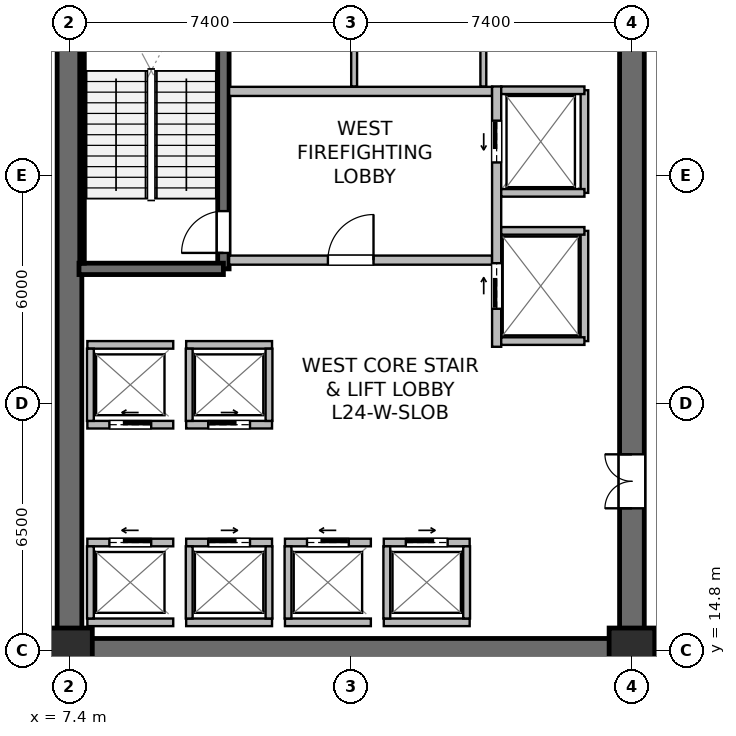
"""IFC4 building model, lengths in metres.
Left out: names, types, materials, properties, quantities, classifications, styles, units other than length and angle.
Written with IfcOpenShell. Run it as: python <this file> out.ifc"""

import sys

from ifc_helpers import new_model, si_unit, direction, frame, frame_2d, origin, origin_2d, place, context, subcontext, project, spatial, rectangle, extrude, source, transform, mapped, element, fill, save


model = new_model("IFC4")
c1 = context("Model", 3, precision=1e-05, world=origin(), true_north=direction((0.0, 1.0)))
c2 = subcontext(c1, "Body", "Model", "MODEL_VIEW")
j1 = project(units=[si_unit("LENGTHUNIT", "METRE"), si_unit("PLANEANGLEUNIT", "RADIAN")], contexts=[c1])
p1 = place(None, origin())
s1 = spatial("IfcSite", under=j1, at=p1, CompositionType="ELEMENT")
p2 = place(p1, origin())
s2 = spatial("IfcBuilding", under=s1, at=p2, CompositionType="ELEMENT")
p3 = place(p2, frame((0.0, 0.0, 100.3)))
s3 = spatial("IfcBuildingStorey", under=s2, at=p3, CompositionType="ELEMENT", Elevation=100.3)
p4 = place(p3, frame((7.075, 14.8, 0.0), z_axis=(0.0, 0.0, 1.0), x_axis=(1.0, 0.0, 0.0)))
e1 = element("IfcWall", 1, at=p4, inside=s3, PredefinedType="SHEAR", context=c2, shape_type="SweptSolid", body=[
    extrude(rectangle(XDim=15.45, YDim=0.65, at=frame_2d((7.725, 0.0))), origin(), (0.0, 0.0, 1.0), 4.49),
])
p5 = place(p3, frame((7.4, 15.125, 0.0), z_axis=(0.0, 0.0, 1.0), x_axis=(0.0, 1.0, 0.0)))
e2 = element("IfcWall", 2, at=p5, inside=s3, PredefinedType="SHEAR", context=c2, shape_type="SweptSolid", body=[
    extrude(rectangle(XDim=18.35, YDim=0.65, at=frame_2d((9.175, 0.0))), origin(), (0.0, 0.0, 1.0), 4.49),
])
p6 = place(p3, frame((22.2, 15.125, 0.0), z_axis=(0.0, 0.0, 1.0), x_axis=(0.0, 1.0, 0.0)))
e3 = element("IfcWall", 3, at=p6, inside=s3, PredefinedType="SHEAR", context=c2, shape_type="SweptSolid", body=[
    extrude(rectangle(XDim=18.35, YDim=0.65, at=frame_2d((9.175, 0.0))), origin(), (0.0, 0.0, 1.0), 4.49),
])
p7 = place(p6, frame((3.425, 0.0, 0.0)))
e4 = element("IfcOpeningElement", 4, at=p7, cuts=e3, PredefinedType="OPENING", context=c2, shape_type="SweptSolid", body=[
    extrude(rectangle(XDim=1.42, YDim=2.2, at=frame_2d((0.71, 1.1))), frame((0.0, 0.335, 0.0), z_axis=(0.0, -1.0, 0.0), x_axis=(1.0, 0.0, 0.0)), (0.0, 0.0, 1.0), 0.67),
])
p8 = place(p3, frame((11.45, 24.85, 0.0), z_axis=(0.0, 0.0, 1.0), x_axis=(0.0, 1.0, 0.0)))
e5 = element("IfcWall", 5, at=p8, inside=s3, PredefinedType="SHEAR", context=c2, shape_type="SweptSolid", body=[
    extrude(rectangle(XDim=8.63, YDim=0.3, at=frame_2d((4.315, 0.0))), origin(), (0.0, 0.0, 1.0), 4.49),
])
p9 = place(p8, frame((0.42, 0.0, 0.0)))
e6 = element("IfcOpeningElement", 6, at=p9, cuts=e5, PredefinedType="OPENING", context=c2, shape_type="SweptSolid", body=[
    extrude(rectangle(XDim=1.1, YDim=2.15, at=frame_2d((0.55, 1.075))), frame((0.0, 0.16, 0.0), z_axis=(0.0, -1.0, 0.0), x_axis=(1.0, 0.0, 0.0)), (0.0, 0.0, 1.0), 0.32),
])
p10 = place(p3, frame((7.65, 24.85, 0.0), z_axis=(0.0, 0.0, 1.0), x_axis=(1.0, 0.0, 0.0)))
e7 = element("IfcWall", 7, at=p10, inside=s3, PredefinedType="SHEAR", context=c2, shape_type="SweptSolid", body=[
    extrude(rectangle(XDim=3.8, YDim=0.3, at=frame_2d((1.9, 0.0))), origin(), (0.0, 0.0, 1.0), 4.49),
])
p11 = place(p3, frame((7.73, 25.0, 0.0), z_axis=(0.0, 0.0, 1.0), x_axis=(0.0, 1.0, 0.0)))
e8 = element("IfcWall", 8, at=p11, inside=s3, PredefinedType="SOLIDWALL", context=c2, shape_type="SweptSolid", body=[
    extrude(rectangle(XDim=8.32, YDim=0.12, at=frame_2d((4.16, 0.0))), origin(), (0.0, 0.0, 1.0), 4.49),
])
m1 = source(origin(), c2, "Body", "SweptSolid", [
    extrude(rectangle(XDim=1.2, YDim=1.2, at=origin_2d()), origin(), (0.0, 0.0, 1.0), 4.8),
])
for number, where, z_axis, x_axis in (
    (9, (7.4, 14.8, 0.0), (0.0, 0.0, 1.0), (1.0, 0.0, 0.0)),
    (10, (22.2, 14.8, 0.0), (0.0, 0.0, 1.0), (1.0, 0.0, 0.0)),
):
    element("IfcColumn", number, at=place(p3, frame(where, z_axis=z_axis, x_axis=x_axis)), inside=s3, PredefinedType="COLUMN", context=c2, shape_type="MappedRepresentation", body=[
        mapped(m1, transform((0.0, 0.0, 0.0), scale=1.0)),
    ])
p12 = place(p3, frame((11.6, 25.08, 0.0), z_axis=(0.0, 0.0, 1.0), x_axis=(1.0, 0.0, 0.0)))
e11 = element("IfcWall", 11, at=p12, inside=s3, PredefinedType="SOLIDWALL", context=c2, shape_type="SweptSolid", body=[
    extrude(rectangle(XDim=6.92, YDim=0.24, at=frame_2d((3.46, 0.0))), origin(), (0.0, 0.0, 1.0), 3.825),
])
p13 = place(p12, frame((2.6, 0.0, 0.0)))
e12 = element("IfcOpeningElement", 12, at=p13, cuts=e11, PredefinedType="OPENING", context=c2, shape_type="SweptSolid", body=[
    extrude(rectangle(XDim=1.2, YDim=2.16, at=frame_2d((0.6, 1.08))), frame((0.0, 0.13, 0.0), z_axis=(0.0, -1.0, 0.0), x_axis=(1.0, 0.0, 0.0)), (0.0, 0.0, 1.0), 0.26),
])
p14 = place(p3, frame((11.6, 29.52, 0.0), z_axis=(0.0, 0.0, 1.0), x_axis=(1.0, 0.0, 0.0)))
e13 = element("IfcWall", 13, at=p14, inside=s3, PredefinedType="SOLIDWALL", context=c2, shape_type="SweptSolid", body=[
    extrude(rectangle(XDim=6.92, YDim=0.24, at=frame_2d((3.46, 0.0))), origin(), (0.0, 0.0, 1.0), 3.825),
])
p15 = place(p3, frame((18.64, 22.8, 0.0), z_axis=(0.0, 0.0, 1.0), x_axis=(0.0, 1.0, 0.0)))
e14 = element("IfcWall", 14, at=p15, inside=s3, PredefinedType="SOLIDWALL", context=c2, shape_type="SweptSolid", body=[
    extrude(rectangle(XDim=6.85, YDim=0.24, at=frame_2d((3.425, 0.0))), origin(), (0.0, 0.0, 1.0), 3.575),
])
p16 = place(p15, frame((4.85, 0.0, 0.0)))
e15 = element("IfcOpeningElement", 15, at=p16, cuts=e14, PredefinedType="OPENING", context=c2, shape_type="SweptSolid", body=[
    extrude(rectangle(XDim=1.1, YDim=2.22, at=frame_2d((0.55, 1.11))), frame((0.0, 0.13, 0.0), z_axis=(0.0, -1.0, 0.0), x_axis=(1.0, 0.0, 0.0)), (0.0, 0.0, 1.0), 0.26),
])
p17 = place(p15, frame((1.0, 0.0, 0.0)))
e16 = element("IfcOpeningElement", 16, at=p17, cuts=e14, PredefinedType="OPENING", context=c2, shape_type="SweptSolid", body=[
    extrude(rectangle(XDim=1.2, YDim=2.22, at=frame_2d((0.6, 1.11))), frame((0.0, 0.13, 0.0), z_axis=(0.0, -1.0, 0.0), x_axis=(1.0, 0.0, 0.0)), (0.0, 0.0, 1.0), 0.26),
])
p18 = place(p3, frame((7.87, 17.65, 0.0), z_axis=(0.0, 0.0, 1.0), x_axis=(1.0, 0.0, 0.0)))
e17 = element("IfcWall", 17, at=p18, inside=s3, PredefinedType="SOLIDWALL", context=c2, shape_type="SweptSolid", body=[
    extrude(rectangle(XDim=2.26, YDim=0.2, at=frame_2d((1.13, 0.0))), origin(), (0.0, 0.0, 1.0), 4.49),
])
p19 = place(p18, frame((0.58, 0.0, 0.0)))
e18 = element("IfcOpeningElement", 18, at=p19, cuts=e17, PredefinedType="OPENING", context=c2, shape_type="SweptSolid", body=[
    extrude(rectangle(XDim=1.1, YDim=2.22, at=frame_2d((0.55, 1.11))), frame((0.0, 0.11, 0.0), z_axis=(0.0, -1.0, 0.0), x_axis=(1.0, 0.0, 0.0)), (0.0, 0.0, 1.0), 0.22),
])
p20 = place(p3, frame((7.87, 15.55, 0.0), z_axis=(0.0, 0.0, 1.0), x_axis=(1.0, 0.0, 0.0)))
e19 = element("IfcWall", 19, at=p20, inside=s3, PredefinedType="SOLIDWALL", context=c2, shape_type="SweptSolid", body=[
    extrude(rectangle(XDim=2.26, YDim=0.2, at=frame_2d((1.13, 0.0))), origin(), (0.0, 0.0, 1.0), 4.49),
])
p21 = place(p3, frame((7.95, 15.65, 0.0), z_axis=(0.0, 0.0, 1.0), x_axis=(0.0, 1.0, 0.0)))
e20 = element("IfcWall", 20, at=p21, inside=s3, PredefinedType="SOLIDWALL", context=c2, shape_type="SweptSolid", body=[
    extrude(rectangle(XDim=1.9, YDim=0.18, at=frame_2d((0.95, 0.0))), origin(), (0.0, 0.0, 1.0), 4.49),
])
p22 = place(p3, frame((10.47, 17.65, 0.0), z_axis=(0.0, 0.0, 1.0), x_axis=(1.0, 0.0, 0.0)))
e21 = element("IfcWall", 21, at=p22, inside=s3, PredefinedType="SOLIDWALL", context=c2, shape_type="SweptSolid", body=[
    extrude(rectangle(XDim=2.26, YDim=0.2, at=frame_2d((1.13, 0.0))), origin(), (0.0, 0.0, 1.0), 4.49),
])
p23 = place(p22, frame((0.58, 0.0, 0.0)))
e22 = element("IfcOpeningElement", 22, at=p23, cuts=e21, PredefinedType="OPENING", context=c2, shape_type="SweptSolid", body=[
    extrude(rectangle(XDim=1.1, YDim=2.22, at=frame_2d((0.55, 1.11))), frame((0.0, 0.11, 0.0), z_axis=(0.0, -1.0, 0.0), x_axis=(1.0, 0.0, 0.0)), (0.0, 0.0, 1.0), 0.22),
])
p24 = place(p3, frame((10.47, 15.55, 0.0), z_axis=(0.0, 0.0, 1.0), x_axis=(1.0, 0.0, 0.0)))
e23 = element("IfcWall", 23, at=p24, inside=s3, PredefinedType="SOLIDWALL", context=c2, shape_type="SweptSolid", body=[
    extrude(rectangle(XDim=2.26, YDim=0.2, at=frame_2d((1.13, 0.0))), origin(), (0.0, 0.0, 1.0), 4.49),
])
for number, where, z_axis, x_axis in (
    (24, (10.55, 15.65, 0.0), (0.0, 0.0, 1.0), (0.0, 1.0, 0.0)),
    (25, (12.65, 15.65, 0.0), (0.0, 0.0, 1.0), (0.0, 1.0, 0.0)),
):
    element("IfcWall", number, at=place(p3, frame(where, z_axis=z_axis, x_axis=x_axis)), inside=s3, PredefinedType="SOLIDWALL", context=c2, shape_type="SweptSolid", body=[
        extrude(rectangle(XDim=1.9, YDim=0.18, at=frame_2d((0.95, 0.0))), origin(), (0.0, 0.0, 1.0), 4.49),
    ])
p25 = place(p3, frame((13.07, 17.65, 0.0), z_axis=(0.0, 0.0, 1.0), x_axis=(1.0, 0.0, 0.0)))
e26 = element("IfcWall", 26, at=p25, inside=s3, PredefinedType="SOLIDWALL", context=c2, shape_type="SweptSolid", body=[
    extrude(rectangle(XDim=2.26, YDim=0.2, at=frame_2d((1.13, 0.0))), origin(), (0.0, 0.0, 1.0), 3.825),
])
p26 = place(p25, frame((0.58, 0.0, 0.0)))
e27 = element("IfcOpeningElement", 27, at=p26, cuts=e26, PredefinedType="OPENING", context=c2, shape_type="SweptSolid", body=[
    extrude(rectangle(XDim=1.1, YDim=2.22, at=frame_2d((0.55, 1.11))), frame((0.0, 0.11, 0.0), z_axis=(0.0, -1.0, 0.0), x_axis=(1.0, 0.0, 0.0)), (0.0, 0.0, 1.0), 0.22),
])
p27 = place(p3, frame((13.07, 15.55, 0.0), z_axis=(0.0, 0.0, 1.0), x_axis=(1.0, 0.0, 0.0)))
e28 = element("IfcWall", 28, at=p27, inside=s3, PredefinedType="SOLIDWALL", context=c2, shape_type="SweptSolid", body=[
    extrude(rectangle(XDim=2.26, YDim=0.2, at=frame_2d((1.13, 0.0))), origin(), (0.0, 0.0, 1.0), 3.825),
])
p28 = place(p3, frame((13.15, 15.65, 0.0), z_axis=(0.0, 0.0, 1.0), x_axis=(0.0, 1.0, 0.0)))
e29 = element("IfcWall", 29, at=p28, inside=s3, PredefinedType="SOLIDWALL", context=c2, shape_type="SweptSolid", body=[
    extrude(rectangle(XDim=1.9, YDim=0.18, at=frame_2d((0.95, 0.0))), origin(), (0.0, 0.0, 1.0), 4.49),
])
p29 = place(p3, frame((15.67, 17.65, 0.0), z_axis=(0.0, 0.0, 1.0), x_axis=(1.0, 0.0, 0.0)))
e30 = element("IfcWall", 30, at=p29, inside=s3, PredefinedType="SOLIDWALL", context=c2, shape_type="SweptSolid", body=[
    extrude(rectangle(XDim=2.26, YDim=0.2, at=frame_2d((1.13, 0.0))), origin(), (0.0, 0.0, 1.0), 4.49),
])
p30 = place(p29, frame((0.58, 0.0, 0.0)))
e31 = element("IfcOpeningElement", 31, at=p30, cuts=e30, PredefinedType="OPENING", context=c2, shape_type="SweptSolid", body=[
    extrude(rectangle(XDim=1.1, YDim=2.22, at=frame_2d((0.55, 1.11))), frame((0.0, 0.11, 0.0), z_axis=(0.0, -1.0, 0.0), x_axis=(1.0, 0.0, 0.0)), (0.0, 0.0, 1.0), 0.22),
])
p31 = place(p3, frame((15.67, 15.55, 0.0), z_axis=(0.0, 0.0, 1.0), x_axis=(1.0, 0.0, 0.0)))
e32 = element("IfcWall", 32, at=p31, inside=s3, PredefinedType="SOLIDWALL", context=c2, shape_type="SweptSolid", body=[
    extrude(rectangle(XDim=2.26, YDim=0.2, at=frame_2d((1.13, 0.0))), origin(), (0.0, 0.0, 1.0), 4.49),
])
for number, where, z_axis, x_axis in (
    (33, (15.75, 15.65, 0.0), (0.0, 0.0, 1.0), (0.0, 1.0, 0.0)),
    (34, (17.85, 15.65, 0.0), (0.0, 0.0, 1.0), (0.0, 1.0, 0.0)),
):
    element("IfcWall", number, at=place(p3, frame(where, z_axis=z_axis, x_axis=x_axis)), inside=s3, PredefinedType="SOLIDWALL", context=c2, shape_type="SweptSolid", body=[
        extrude(rectangle(XDim=1.9, YDim=0.18, at=frame_2d((0.95, 0.0))), origin(), (0.0, 0.0, 1.0), 4.49),
    ])
p32 = place(p3, frame((7.87, 20.75, 0.0), z_axis=(0.0, 0.0, 1.0), x_axis=(1.0, 0.0, 0.0)))
e35 = element("IfcWall", 35, at=p32, inside=s3, PredefinedType="SOLIDWALL", context=c2, shape_type="SweptSolid", body=[
    extrude(rectangle(XDim=2.26, YDim=0.2, at=frame_2d((1.13, 0.0))), origin(), (0.0, 0.0, 1.0), 4.49),
])
p33 = place(p32, frame((0.58, 0.0, 0.0)))
e36 = element("IfcOpeningElement", 36, at=p33, cuts=e35, PredefinedType="OPENING", context=c2, shape_type="SweptSolid", body=[
    extrude(rectangle(XDim=1.1, YDim=2.22, at=frame_2d((0.55, 1.11))), frame((0.0, 0.11, 0.0), z_axis=(0.0, -1.0, 0.0), x_axis=(1.0, 0.0, 0.0)), (0.0, 0.0, 1.0), 0.22),
])
p34 = place(p3, frame((7.87, 22.85, 0.0), z_axis=(0.0, 0.0, 1.0), x_axis=(1.0, 0.0, 0.0)))
e37 = element("IfcWall", 37, at=p34, inside=s3, PredefinedType="SOLIDWALL", context=c2, shape_type="SweptSolid", body=[
    extrude(rectangle(XDim=2.26, YDim=0.2, at=frame_2d((1.13, 0.0))), origin(), (0.0, 0.0, 1.0), 4.49),
])
p35 = place(p3, frame((7.95, 20.85, 0.0), z_axis=(0.0, 0.0, 1.0), x_axis=(0.0, 1.0, 0.0)))
e38 = element("IfcWall", 38, at=p35, inside=s3, PredefinedType="SOLIDWALL", context=c2, shape_type="SweptSolid", body=[
    extrude(rectangle(XDim=1.9, YDim=0.18, at=frame_2d((0.95, 0.0))), origin(), (0.0, 0.0, 1.0), 4.49),
])
p36 = place(p3, frame((10.47, 20.75, 0.0), z_axis=(0.0, 0.0, 1.0), x_axis=(1.0, 0.0, 0.0)))
e39 = element("IfcWall", 39, at=p36, inside=s3, PredefinedType="SOLIDWALL", context=c2, shape_type="SweptSolid", body=[
    extrude(rectangle(XDim=2.26, YDim=0.2, at=frame_2d((1.13, 0.0))), origin(), (0.0, 0.0, 1.0), 4.49),
])
p37 = place(p36, frame((0.58, 0.0, 0.0)))
e40 = element("IfcOpeningElement", 40, at=p37, cuts=e39, PredefinedType="OPENING", context=c2, shape_type="SweptSolid", body=[
    extrude(rectangle(XDim=1.1, YDim=2.22, at=frame_2d((0.55, 1.11))), frame((0.0, 0.11, 0.0), z_axis=(0.0, -1.0, 0.0), x_axis=(1.0, 0.0, 0.0)), (0.0, 0.0, 1.0), 0.22),
])
p38 = place(p3, frame((10.47, 22.85, 0.0), z_axis=(0.0, 0.0, 1.0), x_axis=(1.0, 0.0, 0.0)))
e41 = element("IfcWall", 41, at=p38, inside=s3, PredefinedType="SOLIDWALL", context=c2, shape_type="SweptSolid", body=[
    extrude(rectangle(XDim=2.26, YDim=0.2, at=frame_2d((1.13, 0.0))), origin(), (0.0, 0.0, 1.0), 4.49),
])
for number, where, z_axis, x_axis in (
    (42, (10.55, 20.85, 0.0), (0.0, 0.0, 1.0), (0.0, 1.0, 0.0)),
    (43, (12.65, 20.85, 0.0), (0.0, 0.0, 1.0), (0.0, 1.0, 0.0)),
):
    element("IfcWall", number, at=place(p3, frame(where, z_axis=z_axis, x_axis=x_axis)), inside=s3, PredefinedType="SOLIDWALL", context=c2, shape_type="SweptSolid", body=[
        extrude(rectangle(XDim=1.9, YDim=0.18, at=frame_2d((0.95, 0.0))), origin(), (0.0, 0.0, 1.0), 4.49),
    ])
p39 = place(p3, frame((20.95, 26.85, 0.0), z_axis=(0.0, 0.0, 1.0), x_axis=(0.0, 1.0, 0.0)))
e44 = element("IfcWall", 44, at=p39, inside=s3, PredefinedType="SOLIDWALL", context=c2, shape_type="SweptSolid", body=[
    extrude(rectangle(XDim=2.7, YDim=0.2, at=frame_2d((1.35, 0.0))), origin(), (0.0, 0.0, 1.0), 4.49),
])
p40 = place(p3, frame((18.76, 29.55, 0.0), z_axis=(0.0, 0.0, 1.0), x_axis=(1.0, 0.0, 0.0)))
e45 = element("IfcWall", 45, at=p40, inside=s3, PredefinedType="SOLIDWALL", context=c2, shape_type="SweptSolid", body=[
    extrude(rectangle(XDim=2.19, YDim=0.2, at=frame_2d((1.095, 0.0))), origin(), (0.0, 0.0, 1.0), 4.49),
])
p41 = place(p3, frame((18.76, 26.85, 0.0), z_axis=(0.0, 0.0, 1.0), x_axis=(1.0, 0.0, 0.0)))
e46 = element("IfcWall", 46, at=p41, inside=s3, PredefinedType="SOLIDWALL", context=c2, shape_type="SweptSolid", body=[
    extrude(rectangle(XDim=2.19, YDim=0.2, at=frame_2d((1.095, 0.0))), origin(), (0.0, 0.0, 1.0), 3.887),
])
p42 = place(p3, frame((20.95, 22.95, 0.0), z_axis=(0.0, 0.0, 1.0), x_axis=(0.0, 1.0, 0.0)))
e47 = element("IfcWall", 47, at=p42, inside=s3, PredefinedType="SOLIDWALL", context=c2, shape_type="SweptSolid", body=[
    extrude(rectangle(XDim=2.9, YDim=0.2, at=frame_2d((1.45, 0.0))), origin(), (0.0, 0.0, 1.0), 3.575),
])
for number, where, z_axis, x_axis in (
    (48, (18.76, 25.85, 0.0), (0.0, 0.0, 1.0), (1.0, 0.0, 0.0)),
    (49, (18.76, 22.95, 0.0), (0.0, 0.0, 1.0), (1.0, 0.0, 0.0)),
):
    element("IfcWall", number, at=place(p3, frame(where, z_axis=z_axis, x_axis=x_axis)), inside=s3, PredefinedType="SOLIDWALL", context=c2, shape_type="SweptSolid", body=[
        extrude(rectangle(XDim=2.19, YDim=0.2, at=frame_2d((1.095, 0.0))), origin(), (0.0, 0.0, 1.0), 4.49),
    ])
p43 = place(p3, frame((14.89, 29.65, 0.0), z_axis=(0.0, 0.0, 1.0), x_axis=(0.0, 1.0, 0.0)))
e50 = element("IfcWall", 50, at=p43, inside=s3, PredefinedType="PLUMBINGWALL", context=c2, shape_type="SweptSolid", body=[
    extrude(rectangle(XDim=3.93, YDim=0.155, at=frame_2d((1.965, 0.0))), origin(), (0.0, 0.0, 1.0), 3.825),
])
p44 = place(p3, frame((18.29, 29.65, 0.0), z_axis=(0.0, 0.0, 1.0), x_axis=(0.0, 1.0, 0.0)))
e51 = element("IfcWall", 51, at=p44, inside=s3, PredefinedType="PLUMBINGWALL", context=c2, shape_type="SweptSolid", body=[
    extrude(rectangle(XDim=3.93, YDim=0.155, at=frame_2d((1.965, 0.0))), origin(), (0.0, 0.0, 1.0), 4.49),
])
m2 = source(origin(), c2, "Body", "SweptSolid", [
    extrude(rectangle(XDim=1.1, YDim=2.15, at=frame_2d((0.55, 1.075))), frame((0.0, 0.025, 0.0), z_axis=(0.0, -1.0, 0.0), x_axis=(1.0, 0.0, 0.0)), (0.0, 0.0, 1.0), 0.05),
])
p45 = place(p9, origin())
e52 = element("IfcDoor", 52, at=p45, inside=s3, OperationType="SINGLE_SWING_LEFT", PredefinedType="DOOR", context=c2, shape_type="MappedRepresentation", body=[
    mapped(m2, transform((0.0, 0.0, 0.0), scale=1.0)),
])
fill(e6, e52)
m3 = source(origin(), c2, "Body", "SweptSolid", [
    extrude(rectangle(XDim=1.2, YDim=2.16, at=frame_2d((0.6, 1.08))), frame((0.0, 0.025, 0.0), z_axis=(0.0, -1.0, 0.0), x_axis=(1.0, 0.0, 0.0)), (0.0, 0.0, 1.0), 0.05),
])
p46 = place(p13, origin())
e53 = element("IfcDoor", 53, at=p46, inside=s3, OperationType="SINGLE_SWING_RIGHT", PredefinedType="DOOR", context=c2, shape_type="MappedRepresentation", body=[
    mapped(m3, transform((0.0, 0.0, 0.0), scale=1.0)),
])
fill(e12, e53)
m4 = source(origin(), c2, "Body", "SweptSolid", [
    extrude(rectangle(XDim=1.1, YDim=2.22, at=frame_2d((0.55, 1.11))), frame((0.0, 0.025, 0.0), z_axis=(0.0, -1.0, 0.0), x_axis=(1.0, 0.0, 0.0)), (0.0, 0.0, 1.0), 0.05),
])
p47 = place(p19, origin())
e54 = element("IfcDoor", 54, at=p47, inside=s3, OperationType="SLIDING_TO_LEFT", PredefinedType="USERDEFINED", context=c2, shape_type="MappedRepresentation", body=[
    mapped(m4, transform((0.0, 0.0, 0.0), scale=1.0)),
])
fill(e18, e54)
p48 = place(p23, origin())
e55 = element("IfcDoor", 55, at=p48, inside=s3, OperationType="SLIDING_TO_RIGHT", PredefinedType="USERDEFINED", context=c2, shape_type="MappedRepresentation", body=[
    mapped(m4, transform((0.0, 0.0, 0.0), scale=1.0)),
])
fill(e22, e55)
p49 = place(p26, origin())
e56 = element("IfcDoor", 56, at=p49, inside=s3, OperationType="SLIDING_TO_LEFT", PredefinedType="USERDEFINED", context=c2, shape_type="MappedRepresentation", body=[
    mapped(m4, transform((0.0, 0.0, 0.0), scale=1.0)),
])
fill(e27, e56)
p50 = place(p30, origin())
e57 = element("IfcDoor", 57, at=p50, inside=s3, OperationType="SLIDING_TO_RIGHT", PredefinedType="USERDEFINED", context=c2, shape_type="MappedRepresentation", body=[
    mapped(m4, transform((0.0, 0.0, 0.0), scale=1.0)),
])
fill(e31, e57)
p51 = place(p33, origin())
e58 = element("IfcDoor", 58, at=p51, inside=s3, OperationType="SLIDING_TO_LEFT", PredefinedType="USERDEFINED", context=c2, shape_type="MappedRepresentation", body=[
    mapped(m4, transform((0.0, 0.0, 0.0), scale=1.0)),
])
fill(e36, e58)
p52 = place(p37, origin())
e59 = element("IfcDoor", 59, at=p52, inside=s3, OperationType="SLIDING_TO_RIGHT", PredefinedType="USERDEFINED", context=c2, shape_type="MappedRepresentation", body=[
    mapped(m4, transform((0.0, 0.0, 0.0), scale=1.0)),
])
fill(e40, e59)
p53 = place(p16, origin())
e60 = element("IfcDoor", 60, at=p53, inside=s3, OperationType="SLIDING_TO_LEFT", PredefinedType="USERDEFINED", context=c2, shape_type="MappedRepresentation", body=[
    mapped(m4, transform((0.0, 0.0, 0.0), scale=1.0)),
])
fill(e15, e60)
m5 = source(origin(), c2, "Body", "SweptSolid", [
    extrude(rectangle(XDim=1.2, YDim=2.22, at=frame_2d((0.6, 1.11))), frame((0.0, 0.025, 0.0), z_axis=(0.0, -1.0, 0.0), x_axis=(1.0, 0.0, 0.0)), (0.0, 0.0, 1.0), 0.05),
])
p54 = place(p17, origin())
e61 = element("IfcDoor", 61, at=p54, inside=s3, OperationType="SLIDING_TO_RIGHT", PredefinedType="USERDEFINED", context=c2, shape_type="MappedRepresentation", body=[
    mapped(m5, transform((0.0, 0.0, 0.0), scale=1.0)),
])
fill(e16, e61)
m6 = source(origin(), c2, "Body", "SweptSolid", [
    extrude(rectangle(XDim=1.42, YDim=2.2, at=frame_2d((0.71, 1.1))), frame((0.0, 0.025, 0.0), z_axis=(0.0, -1.0, 0.0), x_axis=(1.0, 0.0, 0.0)), (0.0, 0.0, 1.0), 0.05),
])
p55 = place(p7, origin())
e62 = element("IfcDoor", 62, at=p55, inside=s3, OperationType="DOUBLE_DOOR_SINGLE_SWING", PredefinedType="DOOR", context=c2, shape_type="MappedRepresentation", body=[
    mapped(m6, transform((0.0, 0.0, 0.0), scale=1.0)),
])
fill(e4, e62)
save(model, sys.argv[1])
